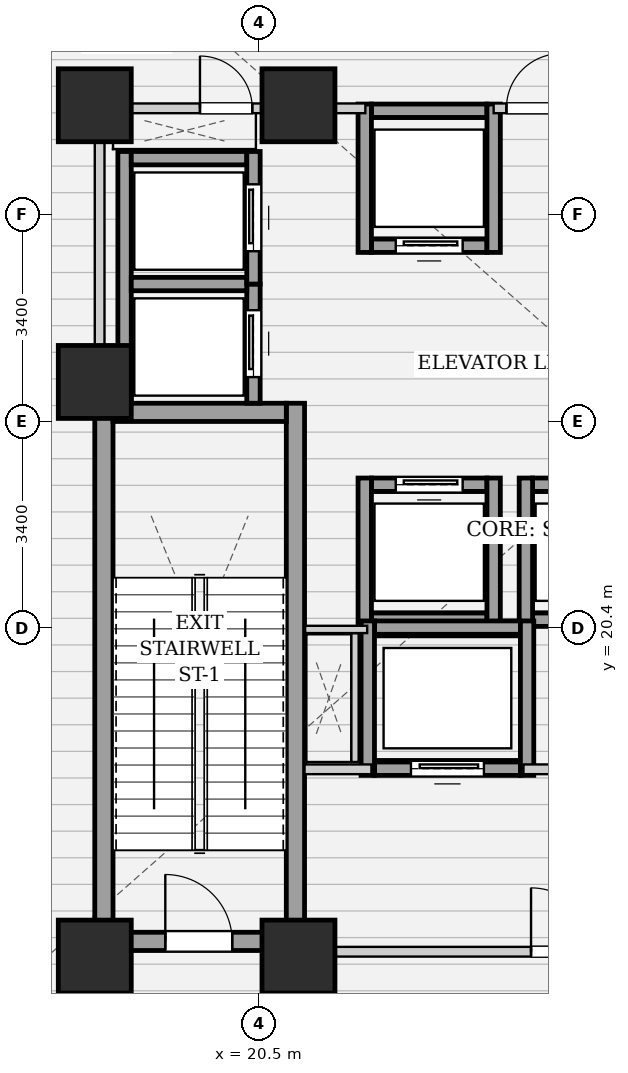
"""IFC4 building model, lengths in metres.
Left out: names, types, materials, properties, quantities, classifications, styles, units other than length and angle.
Written with IfcOpenShell. Run it as: python <this file> out.ifc"""

import sys

from ifc_helpers import new_model, si_unit, direction, frame, frame_2d, origin, origin_2d, place, context, subcontext, project, spatial, rectangle, extrude, element, fill, save


model = new_model("IFC4")
c1 = context("Model", 3, precision=1e-05, world=origin(), true_north=direction((0.0, 1.0)))
c2 = subcontext(c1, "Body", "Model", "MODEL_VIEW")
j1 = project(units=[si_unit("LENGTHUNIT", "METRE"), si_unit("PLANEANGLEUNIT", "RADIAN")], contexts=[c1])
p1 = place(None, origin())
s1 = spatial("IfcSite", under=j1, at=p1, CompositionType="ELEMENT")
p2 = place(p1, origin())
s2 = spatial("IfcBuilding", under=s1, at=p2, CompositionType="ELEMENT")
p3 = place(p2, origin())
s3 = spatial("IfcBuildingStorey", under=s2, at=p3, CompositionType="ELEMENT", Elevation=0.0)
for number, where, z_axis, x_axis in (
    (1, (17.8, 15.0, 0.0), (0.0, 0.0, 1.0), (1.0, 0.0, 0.0)),
    (2, (21.15, 15.0, 0.0), (0.0, 0.0, 1.0), (1.0, 0.0, 0.0)),
    (3, (17.8, 29.0, 0.0), (0.0, 0.0, 1.0), (1.0, 0.0, 0.0)),
    (4, (21.15, 29.0, 0.0), (0.0, 0.0, 1.0), (1.0, 0.0, 0.0)),
    (5, (17.8, 24.45, 0.0), (0.0, 0.0, 1.0), (1.0, 0.0, 0.0)),
):
    element("IfcColumn", number, at=place(p3, frame(where, z_axis=z_axis, x_axis=x_axis)), inside=s3, PredefinedType="COLUMN", context=c2, shape_type="SweptSolid", body=[
        extrude(rectangle(XDim=1.2, YDim=1.2, at=origin_2d()), origin(), (0.0, 0.0, 1.0), 6.0),
    ])
for number, where, z_axis, x_axis in (
    (6, (17.95, 15.1, 0.0), (0.0, 0.0, 1.0), (0.0, 1.0, 0.0)),
    (7, (21.1, 15.1, 0.0), (0.0, 0.0, 1.0), (0.0, 1.0, 0.0)),
):
    element("IfcWall", number, at=place(p3, frame(where, z_axis=z_axis, x_axis=x_axis)), inside=s3, PredefinedType="SHEAR", context=c2, shape_type="SweptSolid", body=[
        extrude(rectangle(XDim=9.0, YDim=0.3, at=frame_2d((4.5, 0.0))), origin(), (0.0, 0.0, 1.0), 5.68),
    ])
p4 = place(p3, frame((18.1, 23.95, 0.0), z_axis=(0.0, 0.0, 1.0), x_axis=(1.0, 0.0, 0.0)))
e8 = element("IfcWall", 8, at=p4, inside=s3, PredefinedType="SHEAR", context=c2, shape_type="SweptSolid", body=[
    extrude(rectangle(XDim=2.85, YDim=0.3, at=frame_2d((1.425, 0.0))), origin(), (0.0, 0.0, 1.0), 5.68),
])
p5 = place(p3, frame((18.1, 15.25, 0.0), z_axis=(0.0, 0.0, 1.0), x_axis=(1.0, 0.0, 0.0)))
e9 = element("IfcWall", 9, at=p5, inside=s3, PredefinedType="SHEAR", context=c2, shape_type="SweptSolid", body=[
    extrude(rectangle(XDim=2.85, YDim=0.3, at=frame_2d((1.425, 0.0))), origin(), (0.0, 0.0, 1.0), 5.68),
])
p6 = place(p5, frame((0.86, 0.0, 0.0)))
e10 = element("IfcOpeningElement", 10, at=p6, cuts=e9, PredefinedType="OPENING", context=c2, shape_type="SweptSolid", body=[
    extrude(rectangle(XDim=1.1, YDim=2.05, at=frame_2d((0.55, 1.025))), frame((0.0, 0.16, 0.0), z_axis=(0.0, -1.0, 0.0), x_axis=(1.0, 0.0, 0.0)), (0.0, 0.0, 1.0), 0.32),
])
p7 = place(p3, frame((22.35, 26.69, 0.0), z_axis=(0.0, 0.0, 1.0), x_axis=(1.0, 0.0, 0.0)))
e11 = element("IfcWall", 11, at=p7, inside=s3, PredefinedType="SHEAR", context=c2, shape_type="SweptSolid", body=[
    extrude(rectangle(XDim=1.9, YDim=0.22, at=frame_2d((0.95, 0.0))), origin(), (0.0, 0.0, 1.0), 5.68),
])
p8 = place(p7, frame((0.4, 0.0, 0.0)))
e12 = element("IfcOpeningElement", 12, at=p8, cuts=e11, PredefinedType="OPENING", context=c2, shape_type="SweptSolid", body=[
    extrude(rectangle(XDim=1.1, YDim=2.15, at=frame_2d((0.55, 1.075))), frame((0.0, 0.12, 0.0), z_axis=(0.0, -1.0, 0.0), x_axis=(1.0, 0.0, 0.0)), (0.0, 0.0, 1.0), 0.24),
])
p9 = place(p3, frame((22.35, 28.91, 0.0), z_axis=(0.0, 0.0, 1.0), x_axis=(1.0, 0.0, 0.0)))
e13 = element("IfcWall", 13, at=p9, inside=s3, PredefinedType="SHEAR", context=c2, shape_type="SweptSolid", body=[
    extrude(rectangle(XDim=1.9, YDim=0.22, at=frame_2d((0.95, 0.0))), origin(), (0.0, 0.0, 1.0), 5.68),
])
for number, where, z_axis, x_axis in (
    (14, (22.24, 26.58, 0.0), (0.0, 0.0, 1.0), (0.0, 1.0, 0.0)),
    (15, (24.36, 26.58, 0.0), (0.0, 0.0, 1.0), (0.0, 1.0, 0.0)),
):
    element("IfcWall", number, at=place(p3, frame(where, z_axis=z_axis, x_axis=x_axis)), inside=s3, PredefinedType="SHEAR", context=c2, shape_type="SweptSolid", body=[
        extrude(rectangle(XDim=2.44, YDim=0.22, at=frame_2d((1.22, 0.0))), origin(), (0.0, 0.0, 1.0), 5.68),
    ])
p10 = place(p3, frame((22.35, 20.54, 0.0), z_axis=(0.0, 0.0, 1.0), x_axis=(1.0, 0.0, 0.0)))
e16 = element("IfcWall", 16, at=p10, inside=s3, PredefinedType="SHEAR", context=c2, shape_type="SweptSolid", body=[
    extrude(rectangle(XDim=1.9, YDim=0.22, at=frame_2d((0.95, 0.0))), origin(), (0.0, 0.0, 1.0), 5.68),
])
p11 = place(p3, frame((22.35, 22.76, 0.0), z_axis=(0.0, 0.0, 1.0), x_axis=(1.0, 0.0, 0.0)))
e17 = element("IfcWall", 17, at=p11, inside=s3, PredefinedType="SHEAR", context=c2, shape_type="SweptSolid", body=[
    extrude(rectangle(XDim=1.9, YDim=0.22, at=frame_2d((0.95, 0.0))), origin(), (0.0, 0.0, 1.0), 5.68),
])
p12 = place(p11, frame((0.4, 0.0, 0.0)))
e18 = element("IfcOpeningElement", 18, at=p12, cuts=e17, PredefinedType="OPENING", context=c2, shape_type="SweptSolid", body=[
    extrude(rectangle(XDim=1.1, YDim=2.15, at=frame_2d((0.55, 1.075))), frame((0.0, 0.12, 0.0), z_axis=(0.0, -1.0, 0.0), x_axis=(1.0, 0.0, 0.0)), (0.0, 0.0, 1.0), 0.24),
])
for number, where, z_axis, x_axis in (
    (19, (22.24, 20.43, 0.0), (0.0, 0.0, 1.0), (0.0, 1.0, 0.0)),
    (20, (24.36, 20.43, 0.0), (0.0, 0.0, 1.0), (0.0, 1.0, 0.0)),
):
    element("IfcWall", number, at=place(p3, frame(where, z_axis=z_axis, x_axis=x_axis)), inside=s3, PredefinedType="SHEAR", context=c2, shape_type="SweptSolid", body=[
        extrude(rectangle(XDim=2.44, YDim=0.22, at=frame_2d((1.22, 0.0))), origin(), (0.0, 0.0, 1.0), 5.68),
    ])
p13 = place(p3, frame((25.0, 20.54, 0.0), z_axis=(0.0, 0.0, 1.0), x_axis=(1.0, 0.0, 0.0)))
e21 = element("IfcWall", 21, at=p13, inside=s3, PredefinedType="SHEAR", context=c2, shape_type="SweptSolid", body=[
    extrude(rectangle(XDim=1.9, YDim=0.22, at=frame_2d((0.95, 0.0))), origin(), (0.0, 0.0, 1.0), 5.68),
])
p14 = place(p3, frame((25.0, 22.76, 0.0), z_axis=(0.0, 0.0, 1.0), x_axis=(1.0, 0.0, 0.0)))
e22 = element("IfcWall", 22, at=p14, inside=s3, PredefinedType="SHEAR", context=c2, shape_type="SweptSolid", body=[
    extrude(rectangle(XDim=1.9, YDim=0.22, at=frame_2d((0.95, 0.0))), origin(), (0.0, 0.0, 1.0), 5.68),
])
p15 = place(p14, frame((0.4, 0.0, 0.0)))
e23 = element("IfcOpeningElement", 23, at=p15, cuts=e22, PredefinedType="OPENING", context=c2, shape_type="SweptSolid", body=[
    extrude(rectangle(XDim=1.1, YDim=2.15, at=frame_2d((0.55, 1.075))), frame((0.0, 0.12, 0.0), z_axis=(0.0, -1.0, 0.0), x_axis=(1.0, 0.0, 0.0)), (0.0, 0.0, 1.0), 0.24),
])
p16 = place(p3, frame((24.89, 20.43, 0.0), z_axis=(0.0, 0.0, 1.0), x_axis=(0.0, 1.0, 0.0)))
e24 = element("IfcWall", 24, at=p16, inside=s3, PredefinedType="SHEAR", context=c2, shape_type="SweptSolid", body=[
    extrude(rectangle(XDim=2.44, YDim=0.22, at=frame_2d((1.22, 0.0))), origin(), (0.0, 0.0, 1.0), 5.68),
])
p17 = place(p3, frame((18.29, 24.1, 0.0), z_axis=(0.0, 0.0, 1.0), x_axis=(0.0, 1.0, 0.0)))
e25 = element("IfcWall", 25, at=p17, inside=s3, PredefinedType="SHEAR", context=c2, shape_type="SweptSolid", body=[
    extrude(rectangle(XDim=4.14, YDim=0.22, at=frame_2d((2.07, 0.0))), origin(), (0.0, 0.0, 1.0), 5.68),
])
p18 = place(p3, frame((20.41, 24.1, 0.0), z_axis=(0.0, 0.0, 1.0), x_axis=(0.0, 1.0, 0.0)))
e26 = element("IfcWall", 26, at=p18, inside=s3, PredefinedType="SHEAR", context=c2, shape_type="SweptSolid", body=[
    extrude(rectangle(XDim=1.96, YDim=0.22, at=frame_2d((0.98, 0.0))), origin(), (0.0, 0.0, 1.0), 5.68),
])
p19 = place(p18, frame((0.43, 0.0, 0.0)))
e27 = element("IfcOpeningElement", 27, at=p19, cuts=e26, PredefinedType="OPENING", context=c2, shape_type="SweptSolid", body=[
    extrude(rectangle(XDim=1.1, YDim=2.15, at=frame_2d((0.55, 1.075))), frame((0.0, 0.12, 0.0), z_axis=(0.0, -1.0, 0.0), x_axis=(1.0, 0.0, 0.0)), (0.0, 0.0, 1.0), 0.24),
])
for number, where, z_axis, x_axis in (
    (28, (18.4, 26.06, 0.0), (0.0, 0.0, 1.0), (1.0, 0.0, 0.0)),
    (29, (18.4, 28.13, 0.0), (0.0, 0.0, 1.0), (1.0, 0.0, 0.0)),
):
    element("IfcWall", number, at=place(p3, frame(where, z_axis=z_axis, x_axis=x_axis)), inside=s3, PredefinedType="SHEAR", context=c2, shape_type="SweptSolid", body=[
        extrude(rectangle(XDim=1.9, YDim=0.22, at=frame_2d((0.95, 0.0))), origin(), (0.0, 0.0, 1.0), 5.68),
    ])
p20 = place(p3, frame((20.41, 26.06, 0.0), z_axis=(0.0, 0.0, 1.0), x_axis=(0.0, 1.0, 0.0)))
e30 = element("IfcWall", 30, at=p20, inside=s3, PredefinedType="SHEAR", context=c2, shape_type="SweptSolid", body=[
    extrude(rectangle(XDim=2.18, YDim=0.22, at=frame_2d((1.09, 0.0))), origin(), (0.0, 0.0, 1.0), 5.68),
])
p21 = place(p20, frame((0.54, 0.0, 0.0)))
e31 = element("IfcOpeningElement", 31, at=p21, cuts=e30, PredefinedType="OPENING", context=c2, shape_type="SweptSolid", body=[
    extrude(rectangle(XDim=1.1, YDim=2.15, at=frame_2d((0.55, 1.075))), frame((0.0, 0.12, 0.0), z_axis=(0.0, -1.0, 0.0), x_axis=(1.0, 0.0, 0.0)), (0.0, 0.0, 1.0), 0.24),
])
p22 = place(p3, frame((22.4, 18.09, 0.0), z_axis=(0.0, 0.0, 1.0), x_axis=(1.0, 0.0, 0.0)))
e32 = element("IfcWall", 32, at=p22, inside=s3, PredefinedType="SHEAR", context=c2, shape_type="SweptSolid", body=[
    extrude(rectangle(XDim=2.4, YDim=0.22, at=frame_2d((1.2, 0.0))), origin(), (0.0, 0.0, 1.0), 5.68),
])
p23 = place(p22, frame((0.6, 0.0, 0.0)))
e33 = element("IfcOpeningElement", 33, at=p23, cuts=e32, PredefinedType="OPENING", context=c2, shape_type="SweptSolid", body=[
    extrude(rectangle(XDim=1.2, YDim=2.15, at=frame_2d((0.6, 1.075))), frame((0.0, 0.12, 0.0), z_axis=(0.0, -1.0, 0.0), x_axis=(1.0, 0.0, 0.0)), (0.0, 0.0, 1.0), 0.24),
])
p24 = place(p3, frame((22.4, 20.41, 0.0), z_axis=(0.0, 0.0, 1.0), x_axis=(1.0, 0.0, 0.0)))
e34 = element("IfcWall", 34, at=p24, inside=s3, PredefinedType="SHEAR", context=c2, shape_type="SweptSolid", body=[
    extrude(rectangle(XDim=2.4, YDim=0.22, at=frame_2d((1.2, 0.0))), origin(), (0.0, 0.0, 1.0), 5.68),
])
for number, where, z_axis, x_axis in (
    (35, (22.29, 17.98, 0.0), (0.0, 0.0, 1.0), (0.0, 1.0, 0.0)),
    (36, (24.91, 17.98, 0.0), (0.0, 0.0, 1.0), (0.0, 1.0, 0.0)),
):
    element("IfcWall", number, at=place(p3, frame(where, z_axis=z_axis, x_axis=x_axis)), inside=s3, PredefinedType="SHEAR", context=c2, shape_type="SweptSolid", body=[
        extrude(rectangle(XDim=2.54, YDim=0.22, at=frame_2d((1.27, 0.0))), origin(), (0.0, 0.0, 1.0), 5.68),
    ])
p25 = place(p3, frame((21.25, 15.08, 0.0), z_axis=(0.0, 0.0, 1.0), x_axis=(1.0, 0.0, 0.0)))
e37 = element("IfcWall", 37, at=p25, inside=s3, PredefinedType="PARTITIONING", context=c2, shape_type="SweptSolid", body=[
    extrude(rectangle(XDim=8.5, YDim=0.16, at=frame_2d((4.25, 0.0))), origin(), (0.0, 0.0, 1.0), 5.68),
])
p26 = place(p25, frame((3.725, 0.0, 0.0)))
e38 = element("IfcOpeningElement", 38, at=p26, cuts=e37, PredefinedType="OPENING", context=c2, shape_type="SweptSolid", body=[
    extrude(rectangle(XDim=1.05, YDim=2.05, at=frame_2d((0.525, 1.025))), frame((0.0, 0.09, 0.0), z_axis=(0.0, -1.0, 0.0), x_axis=(1.0, 0.0, 0.0)), (0.0, 0.0, 1.0), 0.18),
])
p27 = place(p3, frame((21.25, 18.08, 0.0), z_axis=(0.0, 0.0, 1.0), x_axis=(1.0, 0.0, 0.0)))
e39 = element("IfcWall", 39, at=p27, inside=s3, PredefinedType="PARTITIONING", context=c2, shape_type="SweptSolid", body=[
    extrude(rectangle(XDim=1.1, YDim=0.16, at=frame_2d((0.55, 0.0))), origin(), (0.0, 0.0, 1.0), 5.68),
])
p28 = place(p3, frame((24.85, 18.08, 0.0), z_axis=(0.0, 0.0, 1.0), x_axis=(1.0, 0.0, 0.0)))
e40 = element("IfcWall", 40, at=p28, inside=s3, PredefinedType="PARTITIONING", context=c2, shape_type="SweptSolid", body=[
    extrude(rectangle(XDim=1.3, YDim=0.16, at=frame_2d((0.65, 0.0))), origin(), (0.0, 0.0, 1.0), 5.68),
])
p29 = place(p3, frame((17.88, 24.12, 0.0), z_axis=(0.0, 0.0, 1.0), x_axis=(0.0, 1.0, 0.0)))
e41 = element("IfcWall", 41, at=p29, inside=s3, PredefinedType="PARTITIONING", context=c2, shape_type="SweptSolid", body=[
    extrude(rectangle(XDim=4.76, YDim=0.16, at=frame_2d((2.38, 0.0))), origin(), (0.0, 0.0, 1.0), 5.68),
])
p30 = place(p3, frame((24.36, 28.95, 0.0), z_axis=(0.0, 0.0, 1.0), x_axis=(1.0, 0.0, 0.0)))
e42 = element("IfcWall", 42, at=p30, inside=s3, PredefinedType="PARTITIONING", context=c2, shape_type="SweptSolid", body=[
    extrude(rectangle(XDim=1.32, YDim=0.16, at=frame_2d((0.66, 0.0))), origin(), (0.0, 0.0, 1.0), 5.68),
])
p31 = place(p30, frame((0.21, 0.0, 0.0)))
e43 = element("IfcOpeningElement", 43, at=p31, cuts=e42, PredefinedType="OPENING", context=c2, shape_type="SweptSolid", body=[
    extrude(rectangle(XDim=0.9, YDim=2.05, at=frame_2d((0.45, 1.025))), frame((0.0, 0.09, 0.0), z_axis=(0.0, -1.0, 0.0), x_axis=(1.0, 0.0, 0.0)), (0.0, 0.0, 1.0), 0.18),
])
p32 = place(p3, frame((17.96, 28.95, 0.0), z_axis=(0.0, 0.0, 1.0), x_axis=(1.0, 0.0, 0.0)))
e44 = element("IfcWall", 44, at=p32, inside=s3, PredefinedType="PARTITIONING", context=c2, shape_type="SweptSolid", body=[
    extrude(rectangle(XDim=4.29, YDim=0.16, at=frame_2d((2.145, 0.0))), origin(), (0.0, 0.0, 1.0), 5.68),
])
p33 = place(p32, frame((1.57, 0.0, 0.0)))
e45 = element("IfcOpeningElement", 45, at=p33, cuts=e44, PredefinedType="OPENING", context=c2, shape_type="SweptSolid", body=[
    extrude(rectangle(XDim=0.86, YDim=2.05, at=frame_2d((0.43, 1.025))), frame((0.0, 0.09, 0.0), z_axis=(0.0, -1.0, 0.0), x_axis=(1.0, 0.0, 0.0)), (0.0, 0.0, 1.0), 0.18),
])
p34 = place(p3, frame((22.08, 18.2, 0.0), z_axis=(0.0, 0.0, 1.0), x_axis=(0.0, 1.0, 0.0)))
e46 = element("IfcWall", 46, at=p34, inside=s3, PredefinedType="PARTITIONING", context=c2, shape_type="SweptSolid", body=[
    extrude(rectangle(XDim=2.12, YDim=0.12, at=frame_2d((1.06, 0.0))), origin(), (0.0, 0.0, 1.0), 5.68),
])
p35 = place(p3, frame((22.28, 20.38, 0.0), z_axis=(0.0, 0.0, 1.0), x_axis=(-1.0, 0.0, 0.0)))
e47 = element("IfcWall", 47, at=p35, inside=s3, PredefinedType="PARTITIONING", context=c2, shape_type="SweptSolid", body=[
    extrude(rectangle(XDim=1.02, YDim=0.12, at=frame_2d((0.51, 0.0))), origin(), (0.0, 0.0, 1.0), 5.68),
])
p36 = place(p3, frame((17.9, 4.6, 0.0), z_axis=(0.0, 0.0, 1.0), x_axis=(0.0, 1.0, 0.0)))
e48 = element("IfcWall", 48, at=p36, inside=s3, PredefinedType="PARTITIONING", context=c2, shape_type="SweptSolid", body=[
    extrude(rectangle(XDim=10.38, YDim=0.16, at=frame_2d((5.19, 0.0))), origin(), (0.0, 0.0, 1.0), 4.565),
])
p37 = place(p36, frame((1.925, 0.0, 0.0)))
e49 = element("IfcOpeningElement", 49, at=p37, cuts=e48, PredefinedType="OPENING", context=c2, shape_type="SweptSolid", body=[
    extrude(rectangle(XDim=1.05, YDim=2.05, at=frame_2d((0.525, 1.025))), frame((0.0, 0.09, 0.0), z_axis=(0.0, -1.0, 0.0), x_axis=(1.0, 0.0, 0.0)), (0.0, 0.0, 1.0), 0.18),
])
p38 = place(p36, frame((7.075, 0.0, 0.0)))
e50 = element("IfcOpeningElement", 50, at=p38, cuts=e48, PredefinedType="OPENING", context=c2, shape_type="SweptSolid", body=[
    extrude(rectangle(XDim=1.05, YDim=2.05, at=frame_2d((0.525, 1.025))), frame((0.0, 0.09, 0.0), z_axis=(0.0, -1.0, 0.0), x_axis=(1.0, 0.0, 0.0)), (0.0, 0.0, 1.0), 0.18),
])
p39 = place(p6, origin())
e51 = element("IfcDoor", 51, at=p39, inside=s3, OperationType="SINGLE_SWING_LEFT", PredefinedType="DOOR", context=c2, shape_type="SweptSolid", body=[
    extrude(rectangle(XDim=1.1, YDim=2.05, at=frame_2d((0.55, 1.025))), frame((0.0, 0.025, 0.0), z_axis=(0.0, -1.0, 0.0), x_axis=(1.0, 0.0, 0.0)), (0.0, 0.0, 1.0), 0.05),
])
fill(e10, e51)
p40 = place(p8, origin())
e52 = element("IfcDoor", 52, at=p40, inside=s3, OperationType="SLIDING_TO_LEFT", PredefinedType="DOOR", context=c2, shape_type="SweptSolid", body=[
    extrude(rectangle(XDim=1.1, YDim=2.15, at=frame_2d((0.55, 1.075))), frame((0.0, 0.025, 0.0), z_axis=(0.0, -1.0, 0.0), x_axis=(1.0, 0.0, 0.0)), (0.0, 0.0, 1.0), 0.05),
])
fill(e12, e52)
p41 = place(p12, origin())
e53 = element("IfcDoor", 53, at=p41, inside=s3, OperationType="SLIDING_TO_LEFT", PredefinedType="DOOR", context=c2, shape_type="SweptSolid", body=[
    extrude(rectangle(XDim=1.1, YDim=2.15, at=frame_2d((0.55, 1.075))), frame((0.0, 0.025, 0.0), z_axis=(0.0, -1.0, 0.0), x_axis=(1.0, 0.0, 0.0)), (0.0, 0.0, 1.0), 0.05),
])
fill(e18, e53)
p42 = place(p19, origin())
e54 = element("IfcDoor", 54, at=p42, inside=s3, OperationType="SLIDING_TO_LEFT", PredefinedType="DOOR", context=c2, shape_type="SweptSolid", body=[
    extrude(rectangle(XDim=1.1, YDim=2.15, at=frame_2d((0.55, 1.075))), frame((0.0, 0.025, 0.0), z_axis=(0.0, -1.0, 0.0), x_axis=(1.0, 0.0, 0.0)), (0.0, 0.0, 1.0), 0.05),
])
fill(e27, e54)
p43 = place(p21, origin())
e55 = element("IfcDoor", 55, at=p43, inside=s3, OperationType="SLIDING_TO_LEFT", PredefinedType="DOOR", context=c2, shape_type="SweptSolid", body=[
    extrude(rectangle(XDim=1.1, YDim=2.15, at=frame_2d((0.55, 1.075))), frame((0.0, 0.025, 0.0), z_axis=(0.0, -1.0, 0.0), x_axis=(1.0, 0.0, 0.0)), (0.0, 0.0, 1.0), 0.05),
])
fill(e31, e55)
p44 = place(p23, origin())
e56 = element("IfcDoor", 56, at=p44, inside=s3, OperationType="SLIDING_TO_LEFT", PredefinedType="DOOR", context=c2, shape_type="SweptSolid", body=[
    extrude(rectangle(XDim=1.2, YDim=2.15, at=frame_2d((0.6, 1.075))), frame((0.0, 0.025, 0.0), z_axis=(0.0, -1.0, 0.0), x_axis=(1.0, 0.0, 0.0)), (0.0, 0.0, 1.0), 0.05),
])
fill(e33, e56)
p45 = place(p26, origin())
e57 = element("IfcDoor", 57, at=p45, inside=s3, OperationType="SINGLE_SWING_LEFT", PredefinedType="DOOR", context=c2, shape_type="SweptSolid", body=[
    extrude(rectangle(XDim=1.05, YDim=2.05, at=frame_2d((0.525, 1.025))), frame((0.0, 0.025, 0.0), z_axis=(0.0, -1.0, 0.0), x_axis=(1.0, 0.0, 0.0)), (0.0, 0.0, 1.0), 0.05),
])
fill(e38, e57)
p46 = place(p31, origin())
e58 = element("IfcDoor", 58, at=p46, inside=s3, OperationType="SINGLE_SWING_RIGHT", PredefinedType="DOOR", context=c2, shape_type="SweptSolid", body=[
    extrude(rectangle(XDim=0.9, YDim=2.05, at=frame_2d((0.45, 1.025))), frame((0.0, 0.025, 0.0), z_axis=(0.0, -1.0, 0.0), x_axis=(1.0, 0.0, 0.0)), (0.0, 0.0, 1.0), 0.05),
])
fill(e43, e58)
p47 = place(p33, origin())
e59 = element("IfcDoor", 59, at=p47, inside=s3, OperationType="SINGLE_SWING_LEFT", PredefinedType="DOOR", context=c2, shape_type="SweptSolid", body=[
    extrude(rectangle(XDim=0.86, YDim=2.05, at=frame_2d((0.43, 1.025))), frame((0.0, 0.025, 0.0), z_axis=(0.0, -1.0, 0.0), x_axis=(1.0, 0.0, 0.0)), (0.0, 0.0, 1.0), 0.05),
])
fill(e45, e59)
save(model, sys.argv[1])
